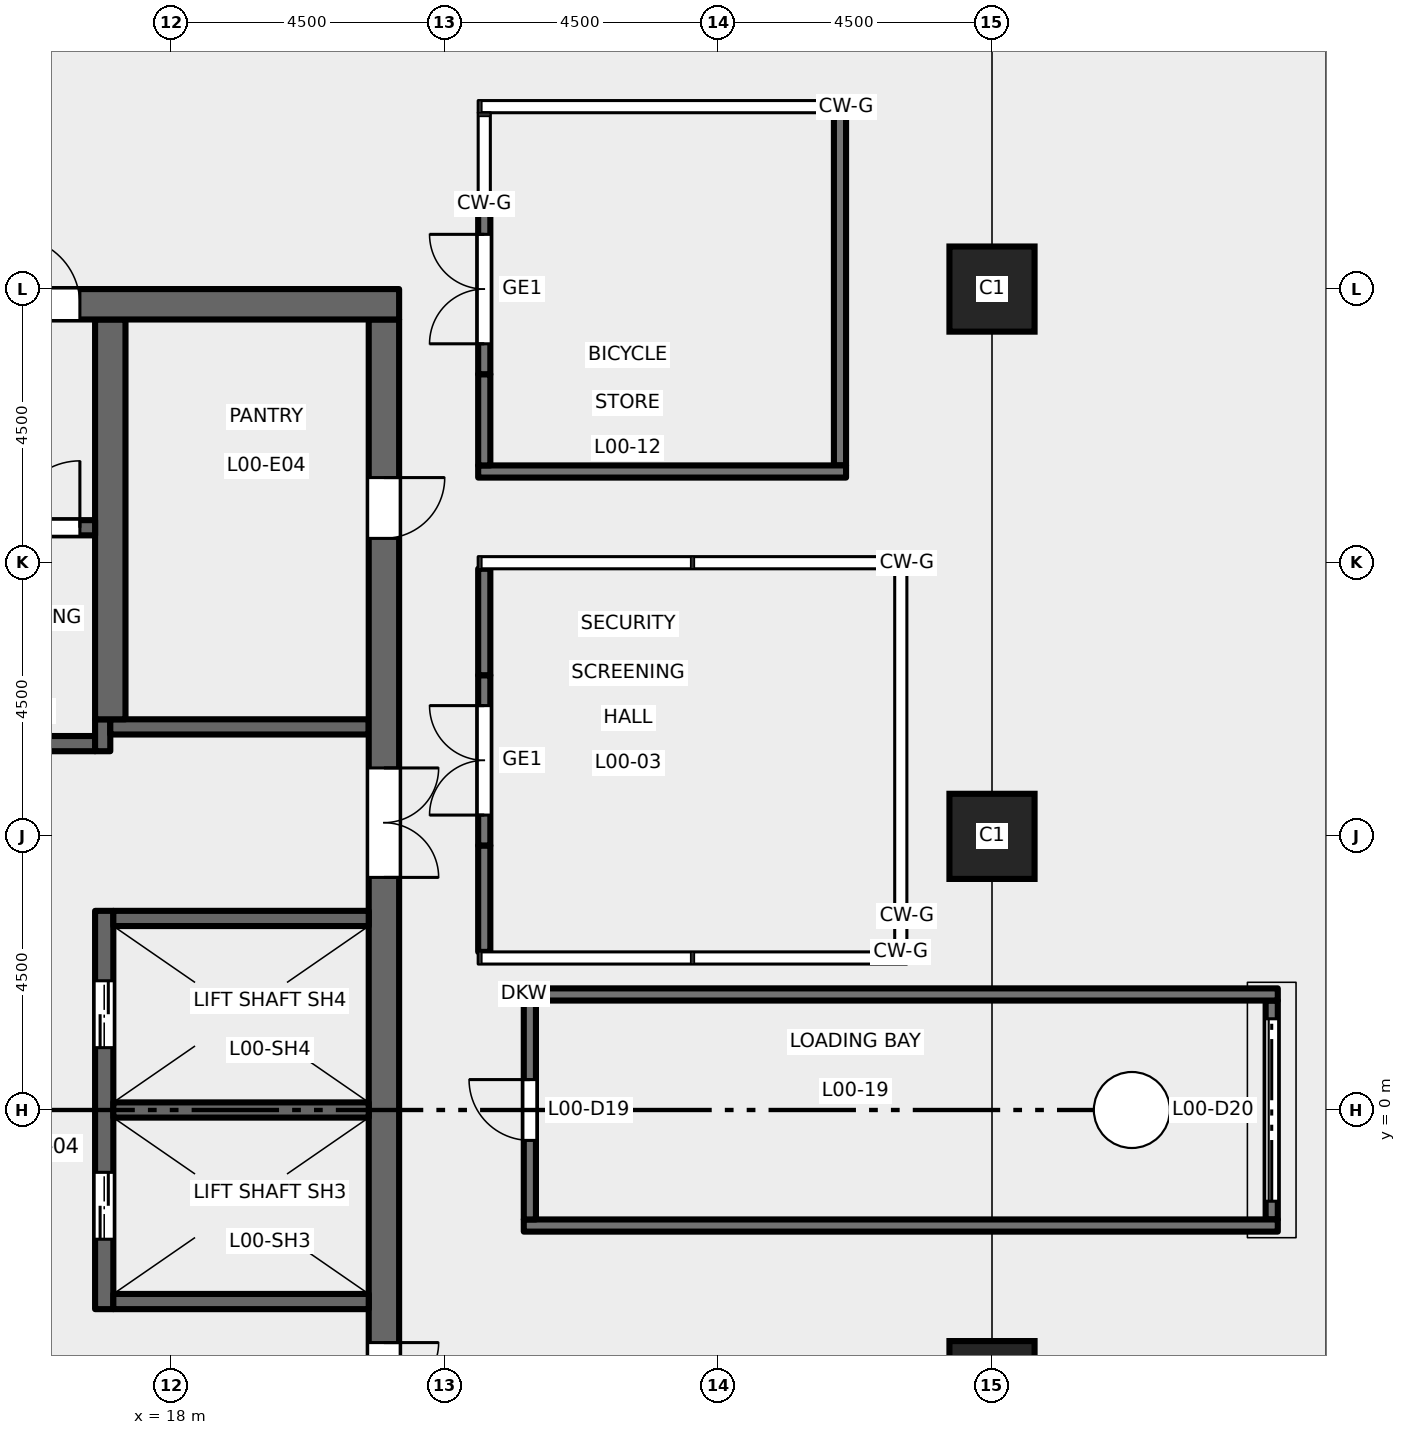
"""IFC4 building model, lengths in metres.
Left out: names, types, materials, properties, quantities, classifications, styles, units other than length and angle.
Written with IfcOpenShell. Run it as: python <this file> out.ifc"""

import sys

from ifc_helpers import new_model, si_unit, direction, frame, frame_2d, origin, origin_2d, place, context, subcontext, project, spatial, rectangle, hollow_rectangle, extrude, element, fill, save


model = new_model("IFC4")
c1 = context("Model", 3, precision=1e-05, world=origin(), true_north=direction((0.0, 1.0)))
c2 = subcontext(c1, "Body", "Model", "MODEL_VIEW")
j1 = project(units=[si_unit("LENGTHUNIT", "METRE"), si_unit("PLANEANGLEUNIT", "RADIAN")], contexts=[c1])
p1 = place(None, origin())
s1 = spatial("IfcSite", under=j1, at=p1, CompositionType="ELEMENT")
p2 = place(p1, origin())
s2 = spatial("IfcBuilding", under=s1, at=p2, CompositionType="ELEMENT")
p3 = place(p2, origin())
s3 = spatial("IfcBuildingStorey", under=s2, at=p3, CompositionType="ELEMENT", Elevation=0.0)
for number, where, z_axis, x_axis in (
    (1, (31.5, -4.5, 0.0), (0.0, 0.0, 1.0), (1.0, 0.0, 0.0)),
    (2, (31.5, 4.5, 0.0), (0.0, 0.0, 1.0), (1.0, 0.0, 0.0)),
    (3, (31.5, 13.5, 0.0), (0.0, 0.0, 1.0), (1.0, 0.0, 0.0)),
):
    element("IfcColumn", number, at=place(p3, frame(where, z_axis=z_axis, x_axis=x_axis)), inside=s3, PredefinedType="COLUMN", context=c2, shape_type="SweptSolid", body=[
        extrude(hollow_rectangle(XDim=1.4, YDim=1.4, WallThickness=0.07, at=origin_2d()), origin(), (0.0, 0.0, 1.0), 7.2),
    ])
p4 = place(p3, frame((12.15, 6.025, 0.0), z_axis=(0.0, 0.0, 1.0), x_axis=(1.0, 0.0, 0.0)))
e4 = element("IfcWall", 4, at=p4, inside=s3, PredefinedType="SHEAR", context=c2, shape_type="SweptSolid", body=[
    extrude(rectangle(XDim=4.6, YDim=0.25, at=frame_2d((2.3, 0.0))), origin(), (0.0, 0.0, 1.0), 7.0),
])
p5 = place(p4, frame((1.8, 0.0, 0.0)))
e5 = element("IfcOpeningElement", 5, at=p5, cuts=e4, PredefinedType="OPENING", context=c2, shape_type="SweptSolid", body=[
    extrude(rectangle(XDim=1.0, YDim=2.1, at=frame_2d((0.5, 1.05))), frame((0.0, 0.135, 0.0), z_axis=(0.0, -1.0, 0.0), x_axis=(1.0, 0.0, 0.0)), (0.0, 0.0, 1.0), 0.27),
])
p6 = place(p3, frame((16.875, 5.9, 0.0), z_axis=(0.0, 0.0, 1.0), x_axis=(0.0, 1.0, 0.0)))
e6 = element("IfcWall", 6, at=p6, inside=s3, PredefinedType="SHEAR", context=c2, shape_type="SweptSolid", body=[
    extrude(rectangle(XDim=0.525, YDim=0.25, at=frame_2d((0.263, 0.0))), origin(), (0.0, 0.0, 1.0), 7.0),
])
p7 = place(p3, frame((17.0, 6.3, 0.0), z_axis=(0.0, 0.0, 1.0), x_axis=(1.0, 0.0, 0.0)))
e7 = element("IfcWall", 7, at=p7, inside=s3, PredefinedType="SHEAR", context=c2, shape_type="SweptSolid", body=[
    extrude(rectangle(XDim=4.25, YDim=0.25, at=frame_2d((2.125, 0.0))), origin(), (0.0, 0.0, 1.0), 7.0),
])
p8 = place(p3, frame((21.5, -13.0, 0.0), z_axis=(0.0, 0.0, 1.0), x_axis=(0.0, 1.0, 0.0)))
e8 = element("IfcWall", 8, at=p8, inside=s3, PredefinedType="SHEAR", context=c2, shape_type="SweptSolid", body=[
    extrude(rectangle(XDim=26.0, YDim=0.5, at=frame_2d((13.0, 0.0))), origin(), (0.0, 0.0, 1.0), 7.0),
])
p9 = place(p8, frame((16.825, 0.0, 0.0)))
e9 = element("IfcOpeningElement", 9, at=p9, cuts=e8, PredefinedType="OPENING", context=c2, shape_type="SweptSolid", body=[
    extrude(rectangle(XDim=1.8, YDim=2.1, at=frame_2d((0.9, 1.05))), frame((0.0, 0.26, 0.0), z_axis=(0.0, -1.0, 0.0), x_axis=(1.0, 0.0, 0.0)), (0.0, 0.0, 1.0), 0.52),
])
p10 = place(p8, frame((7.375, 0.0, 0.0)))
e10 = element("IfcOpeningElement", 10, at=p10, cuts=e8, PredefinedType="OPENING", context=c2, shape_type="SweptSolid", body=[
    extrude(rectangle(XDim=1.8, YDim=2.1, at=frame_2d((0.9, 1.05))), frame((0.0, 0.26, 0.0), z_axis=(0.0, -1.0, 0.0), x_axis=(1.0, 0.0, 0.0)), (0.0, 0.0, 1.0), 0.52),
])
p11 = place(p8, frame((22.4, 0.0, 0.0)))
e11 = element("IfcOpeningElement", 11, at=p11, cuts=e8, PredefinedType="OPENING", context=c2, shape_type="SweptSolid", body=[
    extrude(rectangle(XDim=1.0, YDim=2.1, at=frame_2d((0.5, 1.05))), frame((0.0, 0.26, 0.0), z_axis=(0.0, -1.0, 0.0), x_axis=(1.0, 0.0, 0.0)), (0.0, 0.0, 1.0), 0.52),
])
p12 = place(p8, frame((1.65, 0.0, 0.0)))
e12 = element("IfcOpeningElement", 12, at=p12, cuts=e8, PredefinedType="OPENING", context=c2, shape_type="SweptSolid", body=[
    extrude(rectangle(XDim=1.0, YDim=2.1, at=frame_2d((0.5, 1.05))), frame((0.0, 0.26, 0.0), z_axis=(0.0, -1.0, 0.0), x_axis=(1.0, 0.0, 0.0)), (0.0, 0.0, 1.0), 0.52),
])
p13 = place(p3, frame((16.9, -3.275, 0.0), z_axis=(0.0, 0.0, 1.0), x_axis=(0.0, 1.0, 0.0)))
e13 = element("IfcWall", 13, at=p13, inside=s3, PredefinedType="SHEAR", context=c2, shape_type="SweptSolid", body=[
    extrude(rectangle(XDim=6.55, YDim=0.3, at=frame_2d((3.275, 0.0))), origin(), (0.0, 0.0, 1.0), 7.0),
])
p14 = place(p13, frame((1.15, 0.0, 0.0)))
e14 = element("IfcOpeningElement", 14, at=p14, cuts=e13, PredefinedType="OPENING", context=c2, shape_type="SweptSolid", body=[
    extrude(rectangle(XDim=1.1, YDim=2.1, at=frame_2d((0.55, 1.05))), frame((0.0, 0.16, 0.0), z_axis=(0.0, -1.0, 0.0), x_axis=(1.0, 0.0, 0.0)), (0.0, 0.0, 1.0), 0.32),
])
p15 = place(p13, frame((4.3, 0.0, 0.0)))
e15 = element("IfcOpeningElement", 15, at=p15, cuts=e13, PredefinedType="OPENING", context=c2, shape_type="SweptSolid", body=[
    extrude(rectangle(XDim=1.1, YDim=2.1, at=frame_2d((0.55, 1.05))), frame((0.0, 0.16, 0.0), z_axis=(0.0, -1.0, 0.0), x_axis=(1.0, 0.0, 0.0)), (0.0, 0.0, 1.0), 0.32),
])
for number, where, z_axis, x_axis in (
    (16, (17.05, 0.0, 0.0), (0.0, 0.0, 1.0), (1.0, 0.0, 0.0)),
    (17, (17.05, 3.15, 0.0), (0.0, 0.0, 1.0), (1.0, 0.0, 0.0)),
    (18, (17.05, -3.15, 0.0), (0.0, 0.0, 1.0), (1.0, 0.0, 0.0)),
):
    element("IfcWall", number, at=place(p3, frame(where, z_axis=z_axis, x_axis=x_axis)), inside=s3, PredefinedType="SHEAR", context=c2, shape_type="SweptSolid", body=[
        extrude(rectangle(XDim=4.2, YDim=0.25, at=frame_2d((2.1, 0.0))), origin(), (0.0, 0.0, 1.0), 7.0),
    ])
p16 = place(p3, frame((17.0, 6.425, 0.0), z_axis=(0.0, 0.0, 1.0), x_axis=(0.0, 1.0, 0.0)))
e19 = element("IfcWall", 19, at=p16, inside=s3, PredefinedType="SHEAR", context=c2, shape_type="SweptSolid", body=[
    extrude(rectangle(XDim=6.575, YDim=0.5, at=frame_2d((3.288, 0.0))), origin(), (0.0, 0.0, 1.0), 7.0),
])
p17 = place(p3, frame((8.75, 9.575, 0.0), z_axis=(0.0, 0.0, 1.0), x_axis=(1.0, 0.0, 0.0)))
e20 = element("IfcWall", 20, at=p17, inside=s3, PredefinedType="SHEAR", context=c2, shape_type="SweptSolid", body=[
    extrude(rectangle(XDim=8.0, YDim=0.25, at=frame_2d((4.0, 0.0))), origin(), (0.0, 0.0, 1.0), 7.0),
])
p18 = place(p17, frame((6.65, 0.0, 0.0)))
e21 = element("IfcOpeningElement", 21, at=p18, cuts=e20, PredefinedType="OPENING", context=c2, shape_type="SweptSolid", body=[
    extrude(rectangle(XDim=1.1, YDim=2.1, at=frame_2d((0.55, 1.05))), frame((0.0, 0.135, 0.0), z_axis=(0.0, -1.0, 0.0), x_axis=(1.0, 0.0, 0.0)), (0.0, 0.0, 1.0), 0.27),
])
p19 = place(p3, frame((8.25, 13.25, 0.0), z_axis=(0.0, 0.0, 1.0), x_axis=(1.0, 0.0, 0.0)))
e22 = element("IfcWall", 22, at=p19, inside=s3, PredefinedType="SHEAR", context=c2, shape_type="SweptSolid", body=[
    extrude(rectangle(XDim=13.5, YDim=0.5, at=frame_2d((6.75, 0.0))), origin(), (0.0, 0.0, 1.0), 7.0),
])
p20 = place(p19, frame((7.15, 0.0, 0.0)))
e23 = element("IfcOpeningElement", 23, at=p20, cuts=e22, PredefinedType="OPENING", context=c2, shape_type="SweptSolid", body=[
    extrude(rectangle(XDim=1.1, YDim=2.1, at=frame_2d((0.55, 1.05))), frame((0.0, 0.26, 0.0), z_axis=(0.0, -1.0, 0.0), x_axis=(1.0, 0.0, 0.0)), (0.0, 0.0, 1.0), 0.52),
])
p21 = place(p3, frame((23.15, 2.6, 0.0), z_axis=(0.0, 0.0, 1.0), x_axis=(0.0, 1.0, 0.0)))
e24 = element("IfcWall", 24, at=p21, inside=s3, PredefinedType="SOLIDWALL", context=c2, shape_type="SweptSolid", body=[
    extrude(rectangle(XDim=1.75, YDim=0.2, at=frame_2d((0.875, 0.0))), origin(), (0.0, 0.0, 1.0), 4.3),
])
p22 = place(p3, frame((23.15, 4.35, 0.0), z_axis=(0.0, 0.0, 1.0), x_axis=(0.0, 1.0, 0.0)))
e25 = element("IfcWall", 25, at=p22, inside=s3, PredefinedType="SOLIDWALL", context=c2, shape_type="SweptSolid", body=[
    extrude(rectangle(XDim=2.8, YDim=0.2, at=frame_2d((1.4, 0.0))), origin(), (0.0, 0.0, 1.0), 4.3),
])
p23 = place(p22, frame((0.5, 0.0, 0.0)))
e26 = element("IfcOpeningElement", 26, at=p23, cuts=e25, PredefinedType="OPENING", context=c2, shape_type="SweptSolid", body=[
    extrude(rectangle(XDim=1.8, YDim=2.4, at=frame_2d((0.9, 1.2))), frame((0.0, 0.11, 0.0), z_axis=(0.0, -1.0, 0.0), x_axis=(1.0, 0.0, 0.0)), (0.0, 0.0, 1.0), 0.22),
])
p24 = place(p3, frame((23.15, 7.15, 0.0), z_axis=(0.0, 0.0, 1.0), x_axis=(0.0, 1.0, 0.0)))
e27 = element("IfcWall", 27, at=p24, inside=s3, PredefinedType="SOLIDWALL", context=c2, shape_type="SweptSolid", body=[
    extrude(rectangle(XDim=1.75, YDim=0.2, at=frame_2d((0.875, 0.0))), origin(), (0.0, 0.0, 1.0), 4.3),
])
p25 = place(p3, frame((23.05, 10.5, 0.0), z_axis=(0.0, 0.0, 1.0), x_axis=(1.0, 0.0, 0.0)))
e28 = element("IfcWall", 28, at=p25, inside=s3, PredefinedType="SOLIDWALL", context=c2, shape_type="SweptSolid", body=[
    extrude(rectangle(XDim=6.05, YDim=0.2, at=frame_2d((3.025, 0.0))), origin(), (0.0, 0.0, 1.0), 4.3),
])
p26 = place(p3, frame((29.0, 10.6, 0.0), z_axis=(0.0, 0.0, 1.0), x_axis=(0.0, 1.0, 0.0)))
e29 = element("IfcWall", 29, at=p26, inside=s3, PredefinedType="SOLIDWALL", context=c2, shape_type="SweptSolid", body=[
    extrude(rectangle(XDim=5.8, YDim=0.2, at=frame_2d((2.9, 0.0))), origin(), (0.0, 0.0, 1.0), 4.3),
])
p27 = place(p3, frame((23.15, 10.6, 0.0), z_axis=(0.0, 0.0, 1.0), x_axis=(0.0, 1.0, 0.0)))
e30 = element("IfcWall", 30, at=p27, inside=s3, PredefinedType="SOLIDWALL", context=c2, shape_type="SweptSolid", body=[
    extrude(rectangle(XDim=1.5, YDim=0.2, at=frame_2d((0.75, 0.0))), origin(), (0.0, 0.0, 1.0), 4.3),
])
p28 = place(p3, frame((23.15, 12.1, 0.0), z_axis=(0.0, 0.0, 1.0), x_axis=(0.0, 1.0, 0.0)))
e31 = element("IfcWall", 31, at=p28, inside=s3, PredefinedType="SOLIDWALL", context=c2, shape_type="SweptSolid", body=[
    extrude(rectangle(XDim=2.8, YDim=0.2, at=frame_2d((1.4, 0.0))), origin(), (0.0, 0.0, 1.0), 4.3),
])
p29 = place(p28, frame((0.5, 0.0, 0.0)))
e32 = element("IfcOpeningElement", 32, at=p29, cuts=e31, PredefinedType="OPENING", context=c2, shape_type="SweptSolid", body=[
    extrude(rectangle(XDim=1.8, YDim=2.4, at=frame_2d((0.9, 1.2))), frame((0.0, 0.11, 0.0), z_axis=(0.0, -1.0, 0.0), x_axis=(1.0, 0.0, 0.0)), (0.0, 0.0, 1.0), 0.22),
])
for number, where, z_axis, x_axis in (
    (33, (23.8, 1.9, 0.0), (0.0, 0.0, 1.0), (1.0, 0.0, 0.0)),
    (34, (23.8, -1.9, 0.0), (0.0, 0.0, 1.0), (1.0, 0.0, 0.0)),
):
    element("IfcWall", number, at=place(p3, frame(where, z_axis=z_axis, x_axis=x_axis)), inside=s3, PredefinedType="SOLIDWALL", context=c2, shape_type="SweptSolid", body=[
        extrude(rectangle(XDim=12.4, YDim=0.2, at=frame_2d((6.2, 0.0))), origin(), (0.0, 0.0, 1.0), 4.5),
    ])
p30 = place(p3, frame((23.9, -1.8, 0.0), z_axis=(0.0, 0.0, 1.0), x_axis=(0.0, 1.0, 0.0)))
e35 = element("IfcWall", 35, at=p30, inside=s3, PredefinedType="SOLIDWALL", context=c2, shape_type="SweptSolid", body=[
    extrude(rectangle(XDim=3.6, YDim=0.2, at=frame_2d((1.8, 0.0))), origin(), (0.0, 0.0, 1.0), 4.5),
])
p31 = place(p30, frame((1.3, 0.0, 0.0)))
e36 = element("IfcOpeningElement", 36, at=p31, cuts=e35, PredefinedType="OPENING", context=c2, shape_type="SweptSolid", body=[
    extrude(rectangle(XDim=1.0, YDim=2.1, at=frame_2d((0.5, 1.05))), frame((0.0, 0.11, 0.0), z_axis=(0.0, -1.0, 0.0), x_axis=(1.0, 0.0, 0.0)), (0.0, 0.0, 1.0), 0.22),
])
p32 = place(p3, frame((36.1, -1.8, 0.0), z_axis=(0.0, 0.0, 1.0), x_axis=(0.0, 1.0, 0.0)))
e37 = element("IfcWall", 37, at=p32, inside=s3, PredefinedType="SOLIDWALL", context=c2, shape_type="SweptSolid", body=[
    extrude(rectangle(XDim=3.6, YDim=0.2, at=frame_2d((1.8, 0.0))), origin(), (0.0, 0.0, 1.0), 4.5),
])
p33 = place(p32, frame((0.3, 0.0, 0.0)))
e38 = element("IfcOpeningElement", 38, at=p33, cuts=e37, PredefinedType="OPENING", context=c2, shape_type="SweptSolid", body=[
    extrude(rectangle(XDim=3.0, YDim=3.6, at=frame_2d((1.5, 1.8))), frame((0.0, 0.11, 0.0), z_axis=(0.0, -1.0, 0.0), x_axis=(1.0, 0.0, 0.0)), (0.0, 0.0, 1.0), 0.22),
])
p34 = place(p18, origin())
e39 = element("IfcDoor", 39, at=p34, inside=s3, OperationType="SINGLE_SWING_LEFT", PredefinedType="DOOR", context=c2, shape_type="SweptSolid", body=[
    extrude(rectangle(XDim=1.1, YDim=2.1, at=frame_2d((0.55, 1.05))), frame((0.0, 0.025, 0.0), z_axis=(0.0, -1.0, 0.0), x_axis=(1.0, 0.0, 0.0)), (0.0, 0.0, 1.0), 0.05),
])
fill(e21, e39)
p35 = place(p9, frame((1.8, 0.0, 0.0), z_axis=(0.0, 0.0, 1.0), x_axis=(-1.0, 0.0, 0.0)))
e40 = element("IfcDoor", 40, at=p35, inside=s3, OperationType="DOUBLE_DOOR_DOUBLE_SWING", PredefinedType="DOOR", context=c2, shape_type="SweptSolid", body=[
    extrude(rectangle(XDim=1.8, YDim=2.1, at=frame_2d((0.9, 1.05))), frame((0.0, 0.025, 0.0), z_axis=(0.0, -1.0, 0.0), x_axis=(1.0, 0.0, 0.0)), (0.0, 0.0, 1.0), 0.05),
])
fill(e9, e40)
p36 = place(p10, frame((1.8, 0.0, 0.0), z_axis=(0.0, 0.0, 1.0), x_axis=(-1.0, 0.0, 0.0)))
e41 = element("IfcDoor", 41, at=p36, inside=s3, OperationType="DOUBLE_DOOR_DOUBLE_SWING", PredefinedType="DOOR", context=c2, shape_type="SweptSolid", body=[
    extrude(rectangle(XDim=1.8, YDim=2.1, at=frame_2d((0.9, 1.05))), frame((0.0, 0.025, 0.0), z_axis=(0.0, -1.0, 0.0), x_axis=(1.0, 0.0, 0.0)), (0.0, 0.0, 1.0), 0.05),
])
fill(e10, e41)
p37 = place(p20, origin())
e42 = element("IfcDoor", 42, at=p37, inside=s3, OperationType="SINGLE_SWING_RIGHT", PredefinedType="DOOR", context=c2, shape_type="SweptSolid", body=[
    extrude(rectangle(XDim=1.1, YDim=2.1, at=frame_2d((0.55, 1.05))), frame((0.0, 0.025, 0.0), z_axis=(0.0, -1.0, 0.0), x_axis=(1.0, 0.0, 0.0)), (0.0, 0.0, 1.0), 0.05),
])
fill(e23, e42)
p38 = place(p14, origin())
e43 = element("IfcDoor", 43, at=p38, inside=s3, OperationType="DOUBLE_DOOR_SLIDING", PredefinedType="DOOR", context=c2, shape_type="SweptSolid", body=[
    extrude(rectangle(XDim=1.1, YDim=2.1, at=frame_2d((0.55, 1.05))), frame((0.0, 0.025, 0.0), z_axis=(0.0, -1.0, 0.0), x_axis=(1.0, 0.0, 0.0)), (0.0, 0.0, 1.0), 0.05),
])
fill(e14, e43)
p39 = place(p15, origin())
e44 = element("IfcDoor", 44, at=p39, inside=s3, OperationType="DOUBLE_DOOR_SLIDING", PredefinedType="DOOR", context=c2, shape_type="SweptSolid", body=[
    extrude(rectangle(XDim=1.1, YDim=2.1, at=frame_2d((0.55, 1.05))), frame((0.0, 0.025, 0.0), z_axis=(0.0, -1.0, 0.0), x_axis=(1.0, 0.0, 0.0)), (0.0, 0.0, 1.0), 0.05),
])
fill(e15, e44)
p40 = place(p11, frame((1.0, 0.0, 0.0), z_axis=(0.0, 0.0, 1.0), x_axis=(-1.0, 0.0, 0.0)))
e45 = element("IfcDoor", 45, at=p40, inside=s3, OperationType="SINGLE_SWING_RIGHT", PredefinedType="DOOR", context=c2, shape_type="SweptSolid", body=[
    extrude(rectangle(XDim=1.0, YDim=2.1, at=frame_2d((0.5, 1.05))), frame((0.0, 0.025, 0.0), z_axis=(0.0, -1.0, 0.0), x_axis=(1.0, 0.0, 0.0)), (0.0, 0.0, 1.0), 0.05),
])
fill(e11, e45)
p41 = place(p23, origin())
e46 = element("IfcDoor", 46, at=p41, inside=s3, OperationType="DOUBLE_DOOR_SINGLE_SWING", PredefinedType="DOOR", context=c2, shape_type="SweptSolid", body=[
    extrude(rectangle(XDim=1.8, YDim=2.4, at=frame_2d((0.9, 1.2))), frame((0.0, 0.025, 0.0), z_axis=(0.0, -1.0, 0.0), x_axis=(1.0, 0.0, 0.0)), (0.0, 0.0, 1.0), 0.05),
])
fill(e26, e46)
p42 = place(p29, origin())
e47 = element("IfcDoor", 47, at=p42, inside=s3, OperationType="DOUBLE_DOOR_SINGLE_SWING", PredefinedType="DOOR", context=c2, shape_type="SweptSolid", body=[
    extrude(rectangle(XDim=1.8, YDim=2.4, at=frame_2d((0.9, 1.2))), frame((0.0, 0.025, 0.0), z_axis=(0.0, -1.0, 0.0), x_axis=(1.0, 0.0, 0.0)), (0.0, 0.0, 1.0), 0.05),
])
fill(e32, e47)
p43 = place(p31, origin())
e48 = element("IfcDoor", 48, at=p43, inside=s3, OperationType="SINGLE_SWING_RIGHT", PredefinedType="DOOR", context=c2, shape_type="SweptSolid", body=[
    extrude(rectangle(XDim=1.0, YDim=2.1, at=frame_2d((0.5, 1.05))), frame((0.0, 0.025, 0.0), z_axis=(0.0, -1.0, 0.0), x_axis=(1.0, 0.0, 0.0)), (0.0, 0.0, 1.0), 0.05),
])
fill(e36, e48)
p44 = place(p33, frame((3.0, 0.0, 0.0), z_axis=(0.0, 0.0, 1.0), x_axis=(-1.0, 0.0, 0.0)))
e49 = element("IfcDoor", 49, at=p44, inside=s3, OperationType="ROLLINGUP", PredefinedType="DOOR", context=c2, shape_type="SweptSolid", body=[
    extrude(rectangle(XDim=3.0, YDim=3.6, at=frame_2d((1.5, 1.8))), frame((0.0, 0.025, 0.0), z_axis=(0.0, -1.0, 0.0), x_axis=(1.0, 0.0, 0.0)), (0.0, 0.0, 1.0), 0.05),
])
fill(e38, e49)
save(model, sys.argv[1])
